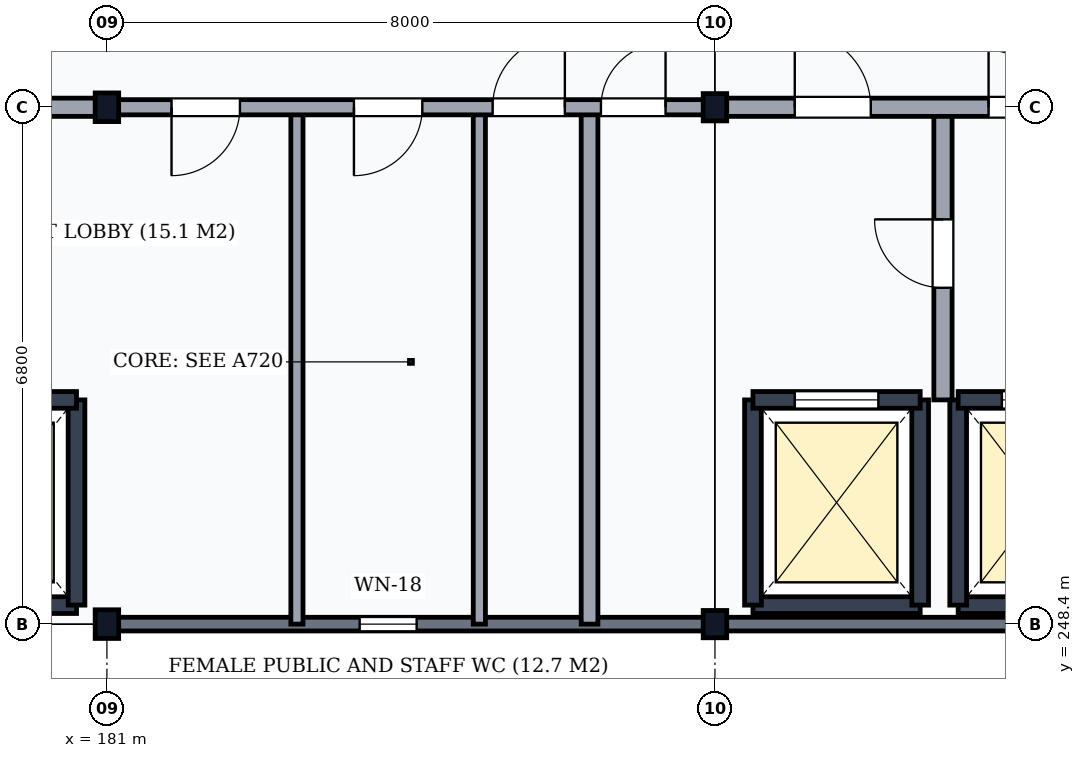
"""IFC4 building model, lengths in metres.
Left out: names, types, materials, properties, quantities, classifications, styles, units other than length and angle.
Written with IfcOpenShell. Run it as: python <this file> out.ifc"""

import sys

from ifc_helpers import new_model, si_unit, direction, frame, frame_2d, origin, origin_2d, place, context, subcontext, project, spatial, rectangle, i_section, extrude, element, fill, save


model = new_model("IFC4")
c1 = context("Model", 3, precision=1e-05, world=origin(), true_north=direction((0.0, 1.0)))
c2 = subcontext(c1, "Body", "Model", "MODEL_VIEW")
j1 = project(units=[si_unit("LENGTHUNIT", "METRE"), si_unit("PLANEANGLEUNIT", "RADIAN")], contexts=[c1])
p1 = place(None, origin())
s1 = spatial("IfcSite", under=j1, at=p1, CompositionType="ELEMENT")
p2 = place(p1, origin())
s2 = spatial("IfcBuilding", under=s1, at=p2, CompositionType="ELEMENT")
p3 = place(p2, frame((0.0, 0.0, 39.9)))
s3 = spatial("IfcBuildingStorey", under=s2, at=p3, CompositionType="ELEMENT", Elevation=39.9)
for number, where, z_axis, x_axis in (
    (1, (181.0, 248.4, 0.0), (0.0, 0.0, 1.0), (1.0, 0.0, 0.0)),
    (2, (181.0, 255.2, 0.0), (0.0, 0.0, 1.0), (1.0, 0.0, 0.0)),
):
    element("IfcColumn", number, at=place(p3, frame(where, z_axis=z_axis, x_axis=x_axis)), inside=s3, PredefinedType="COLUMN", context=c2, shape_type="SweptSolid", body=[
        extrude(i_section(OverallWidth=0.309, OverallDepth=0.377, WebThickness=0.021, FlangeThickness=0.04, FilletRadius=0.027, at=origin_2d()), origin(), (0.0, 0.0, 1.0), 3.9),
    ])
for number, where, z_axis, x_axis in (
    (3, (189.0, 248.4, 0.0), (0.0, 0.0, 1.0), (1.0, 0.0, 0.0)),
    (4, (189.0, 255.2, 0.0), (0.0, 0.0, 1.0), (1.0, 0.0, 0.0)),
):
    element("IfcColumn", number, at=place(p3, frame(where, z_axis=z_axis, x_axis=x_axis)), inside=s3, PredefinedType="COLUMN", context=c2, shape_type="SweptSolid", body=[
        extrude(i_section(OverallWidth=0.309, OverallDepth=0.359, WebThickness=0.021, FlangeThickness=0.04, FilletRadius=0.027, at=origin_2d()), origin(), (0.0, 0.0, 1.0), 3.9),
    ])
p4 = place(p3, frame((181.006, 248.4, 0.0), z_axis=(0.0, 0.0, 1.0), x_axis=(1.0, 0.0, 0.0)))
e5 = element("IfcWall", 5, at=p4, inside=s3, PredefinedType="SOLIDWALL", context=c2, shape_type="SweptSolid", body=[
    extrude(rectangle(XDim=7.988, YDim=0.18, at=frame_2d((3.994, 0.0))), origin(), (0.0, 0.0, 1.0), 3.368),
])
p5 = place(p4, frame((3.319, 0.0, 0.85)))
e6 = element("IfcOpeningElement", 6, at=p5, cuts=e5, PredefinedType="OPENING", context=c2, shape_type="SweptSolid", body=[
    extrude(rectangle(XDim=0.75, YDim=2.0, at=frame_2d((0.375, 1.0))), frame((0.0, 0.105, 0.0), z_axis=(0.0, -1.0, 0.0), x_axis=(1.0, 0.0, 0.0)), (0.0, 0.0, 1.0), 0.21),
])
p6 = place(p3, frame((189.006, 248.4, 0.0), z_axis=(0.0, 0.0, 1.0), x_axis=(1.0, 0.0, 0.0)))
e7 = element("IfcWall", 7, at=p6, inside=s3, PredefinedType="SOLIDWALL", context=c2, shape_type="SweptSolid", body=[
    extrude(rectangle(XDim=7.988, YDim=0.18, at=frame_2d((3.994, 0.0))), origin(), (0.0, 0.0, 1.0), 3.368),
])
p7 = place(p3, frame((178.4, 248.65, 0.0), z_axis=(0.0, 0.0, 1.0), x_axis=(1.0, 0.0, 0.0)))
e8 = element("IfcWall", 8, at=p7, inside=s3, PredefinedType="SHEAR", context=c2, shape_type="SweptSolid", body=[
    extrude(rectangle(XDim=2.2, YDim=0.22, at=frame_2d((1.1, 0.0))), origin(), (0.0, 0.0, 1.0), 3.68),
])
p8 = place(p3, frame((180.6, 248.65, 0.0), z_axis=(0.0, 0.0, 1.0), x_axis=(0.0, 1.0, 0.0)))
e9 = element("IfcWall", 9, at=p8, inside=s3, PredefinedType="SHEAR", context=c2, shape_type="SweptSolid", body=[
    extrude(rectangle(XDim=2.7, YDim=0.22, at=frame_2d((1.35, 0.0))), origin(), (0.0, 0.0, 1.0), 3.68),
])
p9 = place(p3, frame((178.4, 251.35, 0.0), z_axis=(0.0, 0.0, 1.0), x_axis=(1.0, 0.0, 0.0)))
e10 = element("IfcWall", 10, at=p9, inside=s3, PredefinedType="SHEAR", context=c2, shape_type="SweptSolid", body=[
    extrude(rectangle(XDim=2.2, YDim=0.22, at=frame_2d((1.1, 0.0))), origin(), (0.0, 0.0, 1.0), 3.68),
])
p10 = place(p9, frame((0.575, 0.0, 0.0)))
e11 = element("IfcOpeningElement", 11, at=p10, cuts=e10, PredefinedType="OPENING", context=c2, shape_type="SweptSolid", body=[
    extrude(rectangle(XDim=1.05, YDim=2.15, at=frame_2d((0.525, 1.075))), frame((0.0, 0.125, 0.0), z_axis=(0.0, -1.0, 0.0), x_axis=(1.0, 0.0, 0.0)), (0.0, 0.0, 1.0), 0.25),
])
p11 = place(p3, frame((189.5, 248.65, 0.0), z_axis=(0.0, 0.0, 1.0), x_axis=(1.0, 0.0, 0.0)))
e12 = element("IfcWall", 12, at=p11, inside=s3, PredefinedType="SHEAR", context=c2, shape_type="SweptSolid", body=[
    extrude(rectangle(XDim=2.2, YDim=0.22, at=frame_2d((1.1, 0.0))), origin(), (0.0, 0.0, 1.0), 3.68),
])
for number, where, z_axis, x_axis in (
    (13, (189.5, 248.65, 0.0), (0.0, 0.0, 1.0), (0.0, 1.0, 0.0)),
    (14, (191.7, 248.65, 0.0), (0.0, 0.0, 1.0), (0.0, 1.0, 0.0)),
):
    element("IfcWall", number, at=place(p3, frame(where, z_axis=z_axis, x_axis=x_axis)), inside=s3, PredefinedType="SHEAR", context=c2, shape_type="SweptSolid", body=[
        extrude(rectangle(XDim=2.7, YDim=0.22, at=frame_2d((1.35, 0.0))), origin(), (0.0, 0.0, 1.0), 3.68),
    ])
p12 = place(p3, frame((189.5, 251.35, 0.0), z_axis=(0.0, 0.0, 1.0), x_axis=(1.0, 0.0, 0.0)))
e15 = element("IfcWall", 15, at=p12, inside=s3, PredefinedType="SHEAR", context=c2, shape_type="SweptSolid", body=[
    extrude(rectangle(XDim=2.2, YDim=0.22, at=frame_2d((1.1, 0.0))), origin(), (0.0, 0.0, 1.0), 3.68),
])
p13 = place(p12, frame((0.55, 0.0, 0.0)))
e16 = element("IfcOpeningElement", 16, at=p13, cuts=e15, PredefinedType="OPENING", context=c2, shape_type="SweptSolid", body=[
    extrude(rectangle(XDim=1.1, YDim=2.15, at=frame_2d((0.55, 1.075))), frame((0.0, 0.125, 0.0), z_axis=(0.0, -1.0, 0.0), x_axis=(1.0, 0.0, 0.0)), (0.0, 0.0, 1.0), 0.25),
])
p14 = place(p3, frame((192.2, 248.65, 0.0), z_axis=(0.0, 0.0, 1.0), x_axis=(1.0, 0.0, 0.0)))
e17 = element("IfcWall", 17, at=p14, inside=s3, PredefinedType="SHEAR", context=c2, shape_type="SweptSolid", body=[
    extrude(rectangle(XDim=2.2, YDim=0.22, at=frame_2d((1.1, 0.0))), origin(), (0.0, 0.0, 1.0), 3.68),
])
p15 = place(p3, frame((192.2, 248.65, 0.0), z_axis=(0.0, 0.0, 1.0), x_axis=(0.0, 1.0, 0.0)))
e18 = element("IfcWall", 18, at=p15, inside=s3, PredefinedType="SHEAR", context=c2, shape_type="SweptSolid", body=[
    extrude(rectangle(XDim=2.7, YDim=0.22, at=frame_2d((1.35, 0.0))), origin(), (0.0, 0.0, 1.0), 3.68),
])
p16 = place(p3, frame((192.2, 251.35, 0.0), z_axis=(0.0, 0.0, 1.0), x_axis=(1.0, 0.0, 0.0)))
e19 = element("IfcWall", 19, at=p16, inside=s3, PredefinedType="SHEAR", context=c2, shape_type="SweptSolid", body=[
    extrude(rectangle(XDim=2.2, YDim=0.22, at=frame_2d((1.1, 0.0))), origin(), (0.0, 0.0, 1.0), 3.68),
])
p17 = place(p16, frame((0.575, 0.0, 0.0)))
e20 = element("IfcOpeningElement", 20, at=p17, cuts=e19, PredefinedType="OPENING", context=c2, shape_type="SweptSolid", body=[
    extrude(rectangle(XDim=1.05, YDim=2.15, at=frame_2d((0.525, 1.075))), frame((0.0, 0.125, 0.0), z_axis=(0.0, -1.0, 0.0), x_axis=(1.0, 0.0, 0.0)), (0.0, 0.0, 1.0), 0.25),
])
p18 = place(p3, frame((192.0, 251.35, 0.0), z_axis=(0.0, 0.0, 1.0), x_axis=(0.0, 1.0, 0.0)))
e21 = element("IfcWall", 21, at=p18, inside=s3, PredefinedType="PARTITIONING", context=c2, shape_type="SweptSolid", body=[
    extrude(rectangle(XDim=3.85, YDim=0.24, at=frame_2d((1.925, 0.0))), origin(), (0.0, 0.0, 1.0), 3.68),
])
p19 = place(p18, frame((1.475, 0.0, 0.0)))
e22 = element("IfcOpeningElement", 22, at=p19, cuts=e21, PredefinedType="OPENING", context=c2, shape_type="SweptSolid", body=[
    extrude(rectangle(XDim=0.9, YDim=2.1, at=frame_2d((0.45, 1.05))), frame((0.0, 0.135, 0.0), z_axis=(0.0, -1.0, 0.0), x_axis=(1.0, 0.0, 0.0)), (0.0, 0.0, 1.0), 0.27),
])
for number, where, z_axis, x_axis in (
    (23, (183.5, 248.4, 0.0), (0.0, 0.0, 1.0), (0.0, 1.0, 0.0)),
    (24, (185.9, 248.4, 0.0), (0.0, 0.0, 1.0), (0.0, 1.0, 0.0)),
):
    element("IfcWall", number, at=place(p3, frame(where, z_axis=z_axis, x_axis=x_axis)), inside=s3, PredefinedType="PARTITIONING", context=c2, shape_type="SweptSolid", body=[
        extrude(rectangle(XDim=6.8, YDim=0.16, at=frame_2d((3.4, 0.0))), origin(), (0.0, 0.0, 1.0), 3.68),
    ])
p20 = place(p3, frame((187.35, 248.4, 0.0), z_axis=(0.0, 0.0, 1.0), x_axis=(0.0, 1.0, 0.0)))
e25 = element("IfcWall", 25, at=p20, inside=s3, PredefinedType="PARTITIONING", context=c2, shape_type="SweptSolid", body=[
    extrude(rectangle(XDim=6.8, YDim=0.22, at=frame_2d((3.4, 0.0))), origin(), (0.0, 0.0, 1.0), 3.68),
])
p21 = place(p3, frame((173.0, 255.2, 0.0), z_axis=(0.0, 0.0, 1.0), x_axis=(1.0, 0.0, 0.0)))
e26 = element("IfcWall", 26, at=p21, inside=s3, PredefinedType="PARTITIONING", context=c2, shape_type="SweptSolid", body=[
    extrude(rectangle(XDim=8.0, YDim=0.24, at=frame_2d((4.0, 0.0))), origin(), (0.0, 0.0, 1.0), 3.178),
])
p22 = place(p21, frame((1.05, 0.0, 0.0)))
e27 = element("IfcOpeningElement", 27, at=p22, cuts=e26, PredefinedType="OPENING", context=c2, shape_type="SweptSolid", body=[
    extrude(rectangle(XDim=1.0, YDim=2.1, at=frame_2d((0.5, 1.05))), frame((0.0, 0.135, 0.0), z_axis=(0.0, -1.0, 0.0), x_axis=(1.0, 0.0, 0.0)), (0.0, 0.0, 1.0), 0.27),
])
p23 = place(p21, frame((4.6, 0.0, 0.0)))
e28 = element("IfcOpeningElement", 28, at=p23, cuts=e26, PredefinedType="OPENING", context=c2, shape_type="SweptSolid", body=[
    extrude(rectangle(XDim=1.6, YDim=2.25, at=frame_2d((0.8, 1.125))), frame((0.0, 0.135, 0.0), z_axis=(0.0, -1.0, 0.0), x_axis=(1.0, 0.0, 0.0)), (0.0, 0.0, 1.0), 0.27),
])
p24 = place(p3, frame((181.0, 255.2, 0.0), z_axis=(0.0, 0.0, 1.0), x_axis=(1.0, 0.0, 0.0)))
e29 = element("IfcWall", 29, at=p24, inside=s3, PredefinedType="PARTITIONING", context=c2, shape_type="SweptSolid", body=[
    extrude(rectangle(XDim=8.0, YDim=0.2, at=frame_2d((4.0, 0.0))), origin(), (0.0, 0.0, 1.0), 3.178),
])
p25 = place(p24, frame((0.85, 0.0, 0.0)))
e30 = element("IfcOpeningElement", 30, at=p25, cuts=e29, PredefinedType="OPENING", context=c2, shape_type="SweptSolid", body=[
    extrude(rectangle(XDim=0.9, YDim=2.1, at=frame_2d((0.45, 1.05))), frame((0.0, 0.115, 0.0), z_axis=(0.0, -1.0, 0.0), x_axis=(1.0, 0.0, 0.0)), (0.0, 0.0, 1.0), 0.23),
])
p26 = place(p24, frame((3.25, 0.0, 0.0)))
e31 = element("IfcOpeningElement", 31, at=p26, cuts=e29, PredefinedType="OPENING", context=c2, shape_type="SweptSolid", body=[
    extrude(rectangle(XDim=0.9, YDim=2.1, at=frame_2d((0.45, 1.05))), frame((0.0, 0.115, 0.0), z_axis=(0.0, -1.0, 0.0), x_axis=(1.0, 0.0, 0.0)), (0.0, 0.0, 1.0), 0.23),
])
p27 = place(p24, frame((5.075, 0.0, 0.0)))
e32 = element("IfcOpeningElement", 32, at=p27, cuts=e29, PredefinedType="OPENING", context=c2, shape_type="SweptSolid", body=[
    extrude(rectangle(XDim=0.95, YDim=2.1, at=frame_2d((0.475, 1.05))), frame((0.0, 0.115, 0.0), z_axis=(0.0, -1.0, 0.0), x_axis=(1.0, 0.0, 0.0)), (0.0, 0.0, 1.0), 0.23),
])
p28 = place(p24, frame((6.5, 0.0, 0.0)))
e33 = element("IfcOpeningElement", 33, at=p28, cuts=e29, PredefinedType="OPENING", context=c2, shape_type="SweptSolid", body=[
    extrude(rectangle(XDim=0.85, YDim=2.1, at=frame_2d((0.425, 1.05))), frame((0.0, 0.115, 0.0), z_axis=(0.0, -1.0, 0.0), x_axis=(1.0, 0.0, 0.0)), (0.0, 0.0, 1.0), 0.23),
])
p29 = place(p3, frame((189.0, 255.2, 0.0), z_axis=(0.0, 0.0, 1.0), x_axis=(1.0, 0.0, 0.0)))
e34 = element("IfcWall", 34, at=p29, inside=s3, PredefinedType="PARTITIONING", context=c2, shape_type="SweptSolid", body=[
    extrude(rectangle(XDim=8.0, YDim=0.24, at=frame_2d((4.0, 0.0))), origin(), (0.0, 0.0, 1.0), 3.178),
])
p30 = place(p29, frame((1.05, 0.0, 0.0)))
e35 = element("IfcOpeningElement", 35, at=p30, cuts=e34, PredefinedType="OPENING", context=c2, shape_type="SweptSolid", body=[
    extrude(rectangle(XDim=1.0, YDim=2.1, at=frame_2d((0.5, 1.05))), frame((0.0, 0.135, 0.0), z_axis=(0.0, -1.0, 0.0), x_axis=(1.0, 0.0, 0.0)), (0.0, 0.0, 1.0), 0.27),
])
p31 = place(p29, frame((3.6, 0.0, 0.0)))
e36 = element("IfcOpeningElement", 36, at=p31, cuts=e34, PredefinedType="OPENING", context=c2, shape_type="SweptSolid", body=[
    extrude(rectangle(XDim=1.5, YDim=2.25, at=frame_2d((0.75, 1.125))), frame((0.0, 0.135, 0.0), z_axis=(0.0, -1.0, 0.0), x_axis=(1.0, 0.0, 0.0)), (0.0, 0.0, 1.0), 0.27),
])
p32 = place(p29, frame((6.425, 0.0, 0.0)))
e37 = element("IfcOpeningElement", 37, at=p32, cuts=e34, PredefinedType="OPENING", context=c2, shape_type="SweptSolid", body=[
    extrude(rectangle(XDim=0.85, YDim=2.1, at=frame_2d((0.425, 1.05))), frame((0.0, 0.135, 0.0), z_axis=(0.0, -1.0, 0.0), x_axis=(1.0, 0.0, 0.0)), (0.0, 0.0, 1.0), 0.27),
])
p33 = place(p5, origin())
e38 = element("IfcWindow", 38, at=p33, inside=s3, PartitioningType="SINGLE_PANEL", PredefinedType="WINDOW", context=c2, shape_type="SweptSolid", body=[
    extrude(rectangle(XDim=0.75, YDim=2.0, at=frame_2d((0.375, 1.0))), frame((0.0, 0.03, 0.0), z_axis=(0.0, -1.0, 0.0), x_axis=(1.0, 0.0, 0.0)), (0.0, 0.0, 1.0), 0.06),
])
fill(e6, e38)
p34 = place(p13, origin())
e39 = element("IfcDoor", 39, at=p34, inside=s3, OperationType="DOUBLE_DOOR_SLIDING", PredefinedType="USERDEFINED", context=c2, shape_type="SweptSolid", body=[
    extrude(rectangle(XDim=1.1, YDim=2.15, at=frame_2d((0.55, 1.075))), frame((0.0, 0.025, 0.0), z_axis=(0.0, -1.0, 0.0), x_axis=(1.0, 0.0, 0.0)), (0.0, 0.0, 1.0), 0.05),
])
fill(e16, e39)
p35 = place(p17, origin())
e40 = element("IfcDoor", 40, at=p35, inside=s3, OperationType="DOUBLE_DOOR_SLIDING", PredefinedType="USERDEFINED", context=c2, shape_type="SweptSolid", body=[
    extrude(rectangle(XDim=1.05, YDim=2.15, at=frame_2d((0.525, 1.075))), frame((0.0, 0.025, 0.0), z_axis=(0.0, -1.0, 0.0), x_axis=(1.0, 0.0, 0.0)), (0.0, 0.0, 1.0), 0.05),
])
fill(e20, e40)
p36 = place(p19, frame((0.9, 0.0, 0.0), z_axis=(0.0, 0.0, 1.0), x_axis=(-1.0, 0.0, 0.0)))
e41 = element("IfcDoor", 41, at=p36, inside=s3, OperationType="SINGLE_SWING_LEFT", PredefinedType="DOOR", context=c2, shape_type="SweptSolid", body=[
    extrude(rectangle(XDim=0.9, YDim=2.1, at=frame_2d((0.45, 1.05))), frame((0.0, 0.025, 0.0), z_axis=(0.0, -1.0, 0.0), x_axis=(1.0, 0.0, 0.0)), (0.0, 0.0, 1.0), 0.05),
])
fill(e22, e41)
p37 = place(p25, frame((0.9, 0.0, 0.0), z_axis=(0.0, 0.0, 1.0), x_axis=(-1.0, 0.0, 0.0)))
e42 = element("IfcDoor", 42, at=p37, inside=s3, OperationType="SINGLE_SWING_RIGHT", PredefinedType="DOOR", context=c2, shape_type="SweptSolid", body=[
    extrude(rectangle(XDim=0.9, YDim=2.1, at=frame_2d((0.45, 1.05))), frame((0.0, 0.025, 0.0), z_axis=(0.0, -1.0, 0.0), x_axis=(1.0, 0.0, 0.0)), (0.0, 0.0, 1.0), 0.05),
])
fill(e30, e42)
p38 = place(p26, frame((0.9, 0.0, 0.0), z_axis=(0.0, 0.0, 1.0), x_axis=(-1.0, 0.0, 0.0)))
e43 = element("IfcDoor", 43, at=p38, inside=s3, OperationType="SINGLE_SWING_RIGHT", PredefinedType="DOOR", context=c2, shape_type="SweptSolid", body=[
    extrude(rectangle(XDim=0.9, YDim=2.1, at=frame_2d((0.45, 1.05))), frame((0.0, 0.025, 0.0), z_axis=(0.0, -1.0, 0.0), x_axis=(1.0, 0.0, 0.0)), (0.0, 0.0, 1.0), 0.05),
])
fill(e31, e43)
p39 = place(p27, frame((0.95, 0.0, 0.0), z_axis=(0.0, 0.0, 1.0), x_axis=(-1.0, 0.0, 0.0)))
e44 = element("IfcDoor", 44, at=p39, inside=s3, OperationType="SINGLE_SWING_LEFT", PredefinedType="DOOR", context=c2, shape_type="SweptSolid", body=[
    extrude(rectangle(XDim=0.95, YDim=2.1, at=frame_2d((0.475, 1.05))), frame((0.0, 0.025, 0.0), z_axis=(0.0, -1.0, 0.0), x_axis=(1.0, 0.0, 0.0)), (0.0, 0.0, 1.0), 0.05),
])
fill(e32, e44)
p40 = place(p28, frame((0.85, 0.0, 0.0), z_axis=(0.0, 0.0, 1.0), x_axis=(-1.0, 0.0, 0.0)))
e45 = element("IfcDoor", 45, at=p40, inside=s3, OperationType="SINGLE_SWING_LEFT", PredefinedType="DOOR", context=c2, shape_type="SweptSolid", body=[
    extrude(rectangle(XDim=0.85, YDim=2.1, at=frame_2d((0.425, 1.05))), frame((0.0, 0.025, 0.0), z_axis=(0.0, -1.0, 0.0), x_axis=(1.0, 0.0, 0.0)), (0.0, 0.0, 1.0), 0.05),
])
fill(e33, e45)
p41 = place(p30, origin())
e46 = element("IfcDoor", 46, at=p41, inside=s3, OperationType="SINGLE_SWING_LEFT", PredefinedType="DOOR", context=c2, shape_type="SweptSolid", body=[
    extrude(rectangle(XDim=1.0, YDim=2.1, at=frame_2d((0.5, 1.05))), frame((0.0, 0.025, 0.0), z_axis=(0.0, -1.0, 0.0), x_axis=(1.0, 0.0, 0.0)), (0.0, 0.0, 1.0), 0.05),
])
fill(e35, e46)
p42 = place(p31, origin())
e47 = element("IfcDoor", 47, at=p42, inside=s3, OperationType="DOUBLE_DOOR_SINGLE_SWING", PredefinedType="DOOR", context=c2, shape_type="SweptSolid", body=[
    extrude(rectangle(XDim=1.5, YDim=2.25, at=frame_2d((0.75, 1.125))), frame((0.0, 0.025, 0.0), z_axis=(0.0, -1.0, 0.0), x_axis=(1.0, 0.0, 0.0)), (0.0, 0.0, 1.0), 0.05),
])
fill(e36, e47)
save(model, sys.argv[1])
